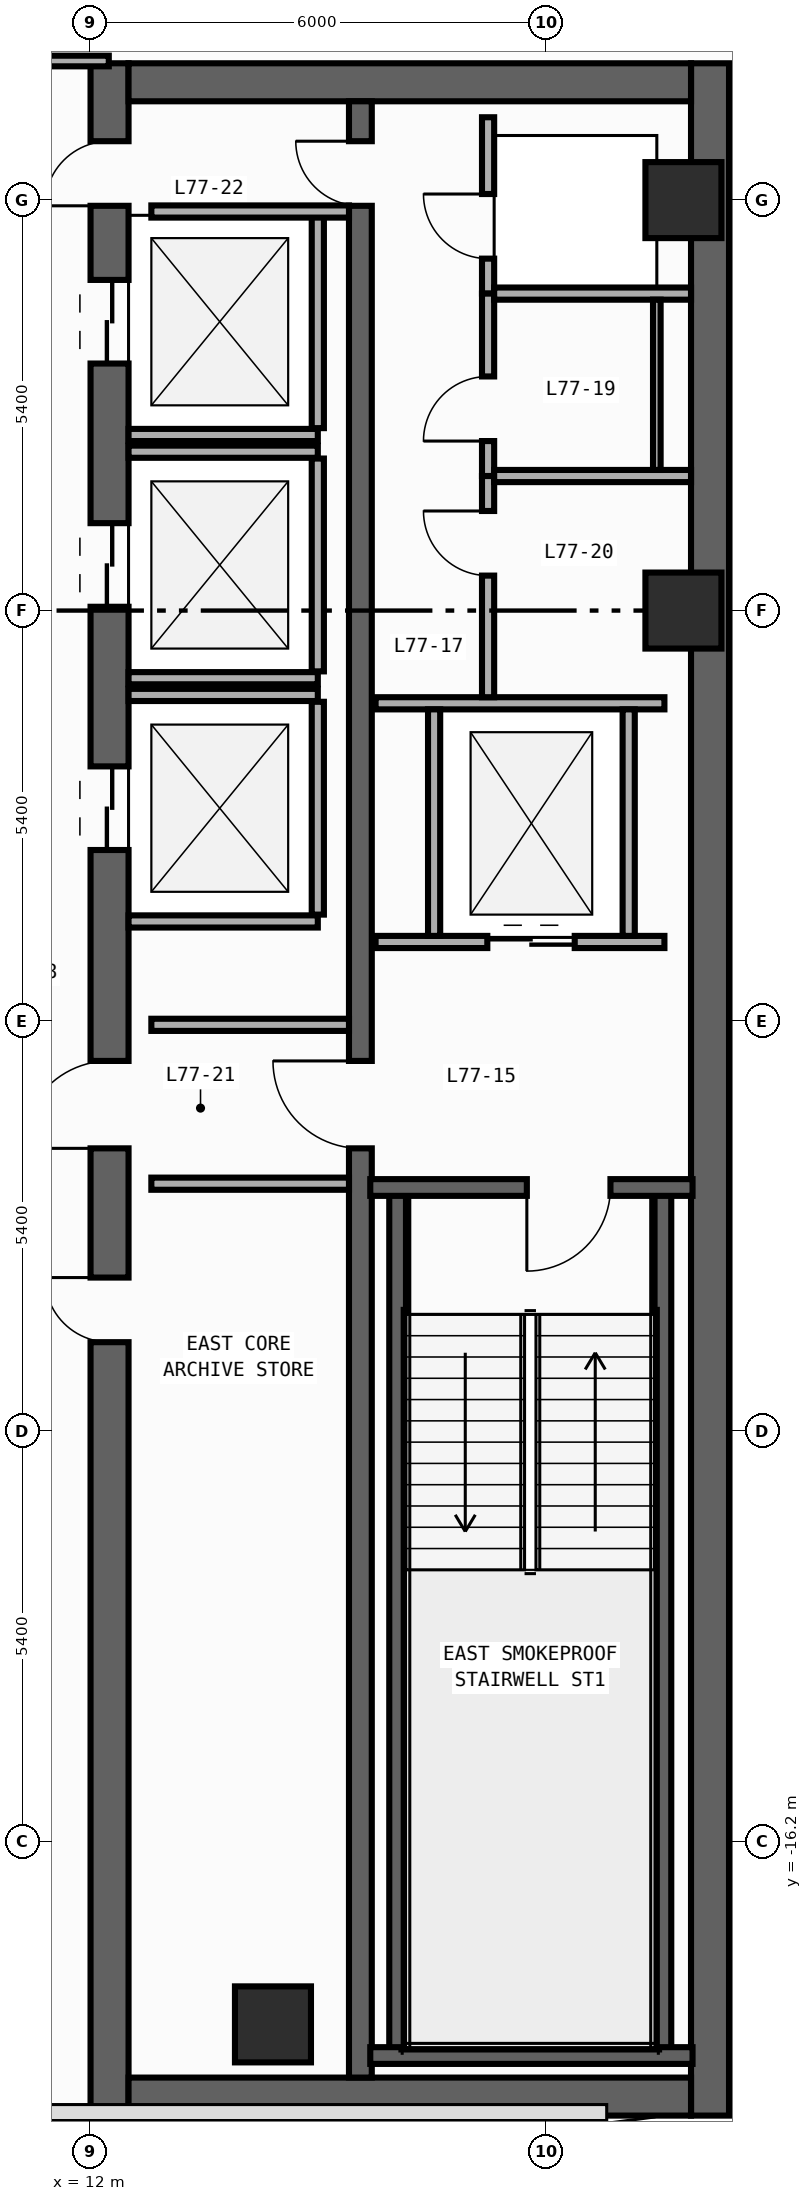
"""IFC4 building model, lengths in metres.
Left out: names, types, materials, properties, quantities, classifications, styles, units other than length and angle.
Written with IfcOpenShell. Run it as: python <this file> out.ifc"""

import sys

from ifc_helpers import new_model, si_unit, direction, frame, frame_2d, origin, origin_2d, place, context, subcontext, project, spatial, rectangle, circle, extrude, element, fill, save


model = new_model("IFC4")
c1 = context("Model", 3, precision=1e-05, world=origin(), true_north=direction((0.0, 1.0)))
c2 = subcontext(c1, "Body", "Model", "MODEL_VIEW")
j1 = project(units=[si_unit("LENGTHUNIT", "METRE"), si_unit("PLANEANGLEUNIT", "RADIAN")], contexts=[c1])
p1 = place(None, origin())
s1 = spatial("IfcSite", under=j1, at=p1, CompositionType="ELEMENT")
p2 = place(p1, origin())
s2 = spatial("IfcBuilding", under=s1, at=p2, CompositionType="ELEMENT")
p3 = place(p2, frame((0.0, 0.0, 320.4)))
s3 = spatial("IfcBuildingStorey", under=s2, at=p3, CompositionType="ELEMENT", Elevation=320.4)
p4 = place(p3, frame((12.25, -19.8, 0.0), z_axis=(0.0, 0.0, 1.0), x_axis=(0.0, 1.0, 0.0)))
e1 = element("IfcWall", 1, at=p4, inside=s3, PredefinedType="SHEAR", context=c2, shape_type="SweptSolid", body=[
    extrude(rectangle(XDim=27.0, YDim=0.5, at=frame_2d((13.5, 0.0))), origin(), (0.0, 0.0, 1.0), 4.45),
])
p5 = place(p4, frame((23.05, 0.0, 0.0)))
e2 = element("IfcOpeningElement", 2, at=p5, cuts=e1, PredefinedType="OPENING", context=c2, shape_type="SweptSolid", body=[
    extrude(rectangle(XDim=1.1, YDim=2.2, at=frame_2d((0.55, 1.1))), frame((0.0, 0.26, 0.0), z_axis=(0.0, -1.0, 0.0), x_axis=(1.0, 0.0, 0.0)), (0.0, 0.0, 1.0), 0.52),
])
p6 = place(p4, frame((19.85, 0.0, 0.0)))
e3 = element("IfcOpeningElement", 3, at=p6, cuts=e1, PredefinedType="OPENING", context=c2, shape_type="SweptSolid", body=[
    extrude(rectangle(XDim=1.1, YDim=2.2, at=frame_2d((0.55, 1.1))), frame((0.0, 0.26, 0.0), z_axis=(0.0, -1.0, 0.0), x_axis=(1.0, 0.0, 0.0)), (0.0, 0.0, 1.0), 0.52),
])
p7 = place(p4, frame((16.65, 0.0, 0.0)))
e4 = element("IfcOpeningElement", 4, at=p7, cuts=e1, PredefinedType="OPENING", context=c2, shape_type="SweptSolid", body=[
    extrude(rectangle(XDim=1.1, YDim=2.2, at=frame_2d((0.55, 1.1))), frame((0.0, 0.26, 0.0), z_axis=(0.0, -1.0, 0.0), x_axis=(1.0, 0.0, 0.0)), (0.0, 0.0, 1.0), 0.52),
])
p8 = place(p4, frame((10.175, 0.0, 0.0)))
e5 = element("IfcOpeningElement", 5, at=p8, cuts=e1, PredefinedType="OPENING", context=c2, shape_type="SweptSolid", body=[
    extrude(rectangle(XDim=0.85, YDim=2.1, at=frame_2d((0.425, 1.05))), frame((0.0, 0.26, 0.0), z_axis=(0.0, -1.0, 0.0), x_axis=(1.0, 0.0, 0.0)), (0.0, 0.0, 1.0), 0.52),
])
p9 = place(p4, frame((12.725, 0.0, 0.0)))
e6 = element("IfcOpeningElement", 6, at=p9, cuts=e1, PredefinedType="OPENING", context=c2, shape_type="SweptSolid", body=[
    extrude(rectangle(XDim=1.15, YDim=2.2, at=frame_2d((0.575, 1.1))), frame((0.0, 0.26, 0.0), z_axis=(0.0, -1.0, 0.0), x_axis=(1.0, 0.0, 0.0)), (0.0, 0.0, 1.0), 0.52),
])
p10 = place(p4, frame((25.125, 0.0, 0.0)))
e7 = element("IfcOpeningElement", 7, at=p10, cuts=e1, PredefinedType="OPENING", context=c2, shape_type="SweptSolid", body=[
    extrude(rectangle(XDim=0.85, YDim=2.1, at=frame_2d((0.425, 1.05))), frame((0.0, 0.26, 0.0), z_axis=(0.0, -1.0, 0.0), x_axis=(1.0, 0.0, 0.0)), (0.0, 0.0, 1.0), 0.52),
])
p11 = place(p3, frame((20.15, -19.8, 0.0), z_axis=(0.0, 0.0, 1.0), x_axis=(0.0, 1.0, 0.0)))
e8 = element("IfcWall", 8, at=p11, inside=s3, PredefinedType="SHEAR", context=c2, shape_type="SweptSolid", body=[
    extrude(rectangle(XDim=27.0, YDim=0.5, at=frame_2d((13.5, 0.0))), origin(), (0.0, 0.0, 1.0), 4.45),
])
for number, where, z_axis, x_axis in (
    (9, (12.5, -19.55, 0.0), (0.0, 0.0, 1.0), (1.0, 0.0, 0.0)),
    (10, (12.5, 6.95, 0.0), (0.0, 0.0, 1.0), (1.0, 0.0, 0.0)),
):
    element("IfcWall", number, at=place(p3, frame(where, z_axis=z_axis, x_axis=x_axis)), inside=s3, PredefinedType="SHEAR", context=c2, shape_type="SweptSolid", body=[
        extrude(rectangle(XDim=7.4, YDim=0.5, at=frame_2d((3.7, 0.0))), origin(), (0.0, 0.0, 1.0), 4.45),
    ])
p12 = place(p3, frame((15.55, -19.3, 0.0), z_axis=(0.0, 0.0, 1.0), x_axis=(0.0, 1.0, 0.0)))
e11 = element("IfcWall", 11, at=p12, inside=s3, PredefinedType="SHEAR", context=c2, shape_type="SweptSolid", body=[
    extrude(rectangle(XDim=26.0, YDim=0.3, at=frame_2d((13.0, 0.0))), origin(), (0.0, 0.0, 1.0), 4.45),
])
p13 = place(p12, frame((12.225, 0.0, 0.0)))
e12 = element("IfcOpeningElement", 12, at=p13, cuts=e11, PredefinedType="OPENING", context=c2, shape_type="SweptSolid", body=[
    extrude(rectangle(XDim=1.15, YDim=2.2, at=frame_2d((0.575, 1.1))), frame((0.0, 0.16, 0.0), z_axis=(0.0, -1.0, 0.0), x_axis=(1.0, 0.0, 0.0)), (0.0, 0.0, 1.0), 0.32),
])
p14 = place(p12, frame((24.625, 0.0, 0.0)))
e13 = element("IfcOpeningElement", 13, at=p14, cuts=e11, PredefinedType="OPENING", context=c2, shape_type="SweptSolid", body=[
    extrude(rectangle(XDim=0.85, YDim=2.1, at=frame_2d((0.425, 1.05))), frame((0.0, 0.16, 0.0), z_axis=(0.0, -1.0, 0.0), x_axis=(1.0, 0.0, 0.0)), (0.0, 0.0, 1.0), 0.32),
])
for number, where, z_axis, x_axis in (
    (14, (16.04, -19.01, 0.0), (0.0, 0.0, 1.0), (0.0, 1.0, 0.0)),
    (15, (19.53, -19.01, 0.0), (0.0, 0.0, 1.0), (0.0, 1.0, 0.0)),
):
    element("IfcWall", number, at=place(p3, frame(where, z_axis=z_axis, x_axis=x_axis)), inside=s3, PredefinedType="SHEAR", context=c2, shape_type="SweptSolid", body=[
        extrude(rectangle(XDim=11.42, YDim=0.22, at=frame_2d((5.71, 0.0))), origin(), (0.0, 0.0, 1.0), 4.45),
    ])
p15 = place(p3, frame((15.68, -19.01, 0.0), z_axis=(0.0, 0.0, 1.0), x_axis=(1.0, 0.0, 0.0)))
e16 = element("IfcWall", 16, at=p15, inside=s3, PredefinedType="SHEAR", context=c2, shape_type="SweptSolid", body=[
    extrude(rectangle(XDim=4.24, YDim=0.22, at=frame_2d((2.12, 0.0))), origin(), (0.0, 0.0, 1.0), 4.45),
])
p16 = place(p3, frame((19.92, -7.59, 0.0), z_axis=(0.0, 0.0, 1.0), x_axis=(-1.0, 0.0, 0.0)))
e17 = element("IfcWall", 17, at=p16, inside=s3, PredefinedType="SHEAR", context=c2, shape_type="SweptSolid", body=[
    extrude(rectangle(XDim=4.24, YDim=0.22, at=frame_2d((2.12, 0.0))), origin(), (0.0, 0.0, 1.0), 4.45),
])
p17 = place(p16, frame((1.08, 0.0, 0.0)))
e18 = element("IfcOpeningElement", 18, at=p17, cuts=e17, PredefinedType="OPENING", context=c2, shape_type="SweptSolid", body=[
    extrude(rectangle(XDim=1.1, YDim=2.2, at=frame_2d((0.55, 1.1))), frame((0.0, 0.12, 0.0), z_axis=(0.0, -1.0, 0.0), x_axis=(1.0, 0.0, 0.0)), (0.0, 0.0, 1.0), 0.24),
])
for number, where, z_axis, x_axis in (
    (19, (14.4, -18.6, 0.0), (0.0, 0.0, 1.0), (1.0, 0.0, 0.0)),
    (20, (19.8, 0.0, 0.0), (0.0, 0.0, 1.0), (1.0, 0.0, 0.0)),
    (21, (19.8, 5.4, 0.0), (0.0, 0.0, 1.0), (1.0, 0.0, 0.0)),
):
    element("IfcColumn", number, at=place(p3, frame(where, z_axis=z_axis, x_axis=x_axis)), inside=s3, PredefinedType="COLUMN", context=c2, shape_type="SweptSolid", body=[
        extrude(circle(Radius=0.5, at=origin_2d()), origin(), (0.0, 0.0, 1.0), 4.8),
    ])
p18 = place(p3, frame((12.5, 2.31, 0.0), z_axis=(0.0, 0.0, 1.0), x_axis=(1.0, 0.0, 0.0)))
e22 = element("IfcWall", 22, at=p18, inside=s3, PredefinedType="STANDARD", context=c2, shape_type="SweptSolid", body=[
    extrude(rectangle(XDim=2.49, YDim=0.16, at=frame_2d((1.245, 0.0))), origin(), (0.0, 0.0, 1.0), 4.45),
])
p19 = place(p3, frame((14.99, 2.4, 0.0), z_axis=(0.0, 0.0, 1.0), x_axis=(0.0, 1.0, 0.0)))
e23 = element("IfcWall", 23, at=p19, inside=s3, PredefinedType="STANDARD", context=c2, shape_type="SweptSolid", body=[
    extrude(rectangle(XDim=2.8, YDim=0.16, at=frame_2d((1.4, 0.0))), origin(), (0.0, 0.0, 1.0), 4.45),
])
for number, where, z_axis, x_axis in (
    (24, (12.5, -0.89, 0.0), (0.0, 0.0, 1.0), (1.0, 0.0, 0.0)),
    (25, (12.5, 2.09, 0.0), (0.0, 0.0, 1.0), (1.0, 0.0, 0.0)),
):
    element("IfcWall", number, at=place(p3, frame(where, z_axis=z_axis, x_axis=x_axis)), inside=s3, PredefinedType="STANDARD", context=c2, shape_type="SweptSolid", body=[
        extrude(rectangle(XDim=2.49, YDim=0.16, at=frame_2d((1.245, 0.0))), origin(), (0.0, 0.0, 1.0), 4.45),
    ])
p20 = place(p3, frame((14.99, -0.8, 0.0), z_axis=(0.0, 0.0, 1.0), x_axis=(0.0, 1.0, 0.0)))
e26 = element("IfcWall", 26, at=p20, inside=s3, PredefinedType="STANDARD", context=c2, shape_type="SweptSolid", body=[
    extrude(rectangle(XDim=2.8, YDim=0.16, at=frame_2d((1.4, 0.0))), origin(), (0.0, 0.0, 1.0), 4.45),
])
for number, where, z_axis, x_axis in (
    (27, (12.5, -4.09, 0.0), (0.0, 0.0, 1.0), (1.0, 0.0, 0.0)),
    (28, (12.5, -1.11, 0.0), (0.0, 0.0, 1.0), (1.0, 0.0, 0.0)),
):
    element("IfcWall", number, at=place(p3, frame(where, z_axis=z_axis, x_axis=x_axis)), inside=s3, PredefinedType="STANDARD", context=c2, shape_type="SweptSolid", body=[
        extrude(rectangle(XDim=2.49, YDim=0.16, at=frame_2d((1.245, 0.0))), origin(), (0.0, 0.0, 1.0), 4.45),
    ])
p21 = place(p3, frame((14.99, -4.0, 0.0), z_axis=(0.0, 0.0, 1.0), x_axis=(0.0, 1.0, 0.0)))
e29 = element("IfcWall", 29, at=p21, inside=s3, PredefinedType="STANDARD", context=c2, shape_type="SweptSolid", body=[
    extrude(rectangle(XDim=2.8, YDim=0.16, at=frame_2d((1.4, 0.0))), origin(), (0.0, 0.0, 1.0), 4.45),
])
p22 = place(p3, frame((15.75, -4.36, 0.0), z_axis=(0.0, 0.0, 1.0), x_axis=(1.0, 0.0, 0.0)))
e30 = element("IfcWall", 30, at=p22, inside=s3, PredefinedType="STANDARD", context=c2, shape_type="SweptSolid", body=[
    extrude(rectangle(XDim=3.8, YDim=0.16, at=frame_2d((1.9, 0.0))), origin(), (0.0, 0.0, 1.0), 4.45),
])
p23 = place(p22, frame((1.47, 0.0, 0.0)))
e31 = element("IfcOpeningElement", 31, at=p23, cuts=e30, PredefinedType="OPENING", context=c2, shape_type="SweptSolid", body=[
    extrude(rectangle(XDim=1.15, YDim=2.2, at=frame_2d((0.575, 1.1))), frame((0.0, 0.09, 0.0), z_axis=(0.0, -1.0, 0.0), x_axis=(1.0, 0.0, 0.0)), (0.0, 0.0, 1.0), 0.18),
])
p24 = place(p3, frame((15.75, -1.22, 0.0), z_axis=(0.0, 0.0, 1.0), x_axis=(1.0, 0.0, 0.0)))
e32 = element("IfcWall", 32, at=p24, inside=s3, PredefinedType="STANDARD", context=c2, shape_type="SweptSolid", body=[
    extrude(rectangle(XDim=3.8, YDim=0.16, at=frame_2d((1.9, 0.0))), origin(), (0.0, 0.0, 1.0), 4.45),
])
for number, where, z_axis, x_axis in (
    (33, (16.52, -4.28, 0.0), (0.0, 0.0, 1.0), (0.0, 1.0, 0.0)),
    (34, (19.08, -4.28, 0.0), (0.0, 0.0, 1.0), (0.0, 1.0, 0.0)),
):
    element("IfcWall", number, at=place(p3, frame(where, z_axis=z_axis, x_axis=x_axis)), inside=s3, PredefinedType="STANDARD", context=c2, shape_type="SweptSolid", body=[
        extrude(rectangle(XDim=2.98, YDim=0.16, at=frame_2d((1.49, 0.0))), origin(), (0.0, 0.0, 1.0), 4.45),
    ])
for number, where, z_axis, x_axis in (
    (35, (12.8, -5.45, 0.0), (0.0, 0.0, 1.0), (1.0, 0.0, 0.0)),
    (36, (12.8, -7.54, 0.0), (0.0, 0.0, 1.0), (1.0, 0.0, 0.0)),
    (37, (12.8, 5.25, 0.0), (0.0, 0.0, 1.0), (1.0, 0.0, 0.0)),
):
    element("IfcWall", number, at=place(p3, frame(where, z_axis=z_axis, x_axis=x_axis)), inside=s3, PredefinedType="STANDARD", context=c2, shape_type="SweptSolid", body=[
        extrude(rectangle(XDim=2.6, YDim=0.16, at=frame_2d((1.3, 0.0))), origin(), (0.0, 0.0, 1.0), 4.45),
    ])
p25 = place(p3, frame((17.23, 4.17, 0.0), z_axis=(0.0, 0.0, 1.0), x_axis=(0.0, 1.0, 0.0)))
e38 = element("IfcWall", 38, at=p25, inside=s3, PredefinedType="PARTITIONING", context=c2, shape_type="SweptSolid", body=[
    extrude(rectangle(XDim=2.32, YDim=0.16, at=frame_2d((1.16, 0.0))), origin(), (0.0, 0.0, 1.0), 4.45),
])
p26 = place(p25, frame((0.46, 0.0, 0.0)))
e39 = element("IfcOpeningElement", 39, at=p26, cuts=e38, PredefinedType="OPENING", context=c2, shape_type="SweptSolid", body=[
    extrude(rectangle(XDim=0.85, YDim=2.1, at=frame_2d((0.425, 1.05))), frame((0.0, 0.09, 0.0), z_axis=(0.0, -1.0, 0.0), x_axis=(1.0, 0.0, 0.0)), (0.0, 0.0, 1.0), 0.18),
])
p27 = place(p3, frame((17.23, 1.77, 0.0), z_axis=(0.0, 0.0, 1.0), x_axis=(0.0, 1.0, 0.0)))
e40 = element("IfcWall", 40, at=p27, inside=s3, PredefinedType="PARTITIONING", context=c2, shape_type="SweptSolid", body=[
    extrude(rectangle(XDim=2.4, YDim=0.16, at=frame_2d((1.2, 0.0))), origin(), (0.0, 0.0, 1.0), 4.45),
])
p28 = place(p27, frame((0.46, 0.0, 0.0)))
e41 = element("IfcOpeningElement", 41, at=p28, cuts=e40, PredefinedType="OPENING", context=c2, shape_type="SweptSolid", body=[
    extrude(rectangle(XDim=0.85, YDim=2.1, at=frame_2d((0.425, 1.05))), frame((0.0, 0.09, 0.0), z_axis=(0.0, -1.0, 0.0), x_axis=(1.0, 0.0, 0.0)), (0.0, 0.0, 1.0), 0.18),
])
p29 = place(p3, frame((17.23, -1.14, 0.0), z_axis=(0.0, 0.0, 1.0), x_axis=(0.0, 1.0, 0.0)))
e42 = element("IfcWall", 42, at=p29, inside=s3, PredefinedType="PARTITIONING", context=c2, shape_type="SweptSolid", body=[
    extrude(rectangle(XDim=2.91, YDim=0.16, at=frame_2d((1.455, 0.0))), origin(), (0.0, 0.0, 1.0), 4.45),
])
p30 = place(p29, frame((1.6, 0.0, 0.0)))
e43 = element("IfcOpeningElement", 43, at=p30, cuts=e42, PredefinedType="OPENING", context=c2, shape_type="SweptSolid", body=[
    extrude(rectangle(XDim=0.85, YDim=2.1, at=frame_2d((0.425, 1.05))), frame((0.0, 0.09, 0.0), z_axis=(0.0, -1.0, 0.0), x_axis=(1.0, 0.0, 0.0)), (0.0, 0.0, 1.0), 0.18),
])
for number, where, z_axis, x_axis in (
    (44, (17.31, 4.17, 0.0), (0.0, 0.0, 1.0), (1.0, 0.0, 0.0)),
    (45, (17.31, 1.77, 0.0), (0.0, 0.0, 1.0), (1.0, 0.0, 0.0)),
):
    element("IfcWall", number, at=place(p3, frame(where, z_axis=z_axis, x_axis=x_axis)), inside=s3, PredefinedType="PARTITIONING", context=c2, shape_type="SweptSolid", body=[
        extrude(rectangle(XDim=2.59, YDim=0.16, at=frame_2d((1.295, 0.0))), origin(), (0.0, 0.0, 1.0), 4.45),
    ])
p31 = place(p3, frame((4.52, 7.23, 0.0), z_axis=(0.0, 0.0, 1.0), x_axis=(1.0, 0.0, 0.0)))
e46 = element("IfcWall", 46, at=p31, inside=s3, PredefinedType="PARTITIONING", context=c2, shape_type="SweptSolid", body=[
    extrude(rectangle(XDim=7.72, YDim=0.14, at=frame_2d((3.86, 0.0))), origin(), (0.0, 0.0, 1.0), 3.55),
])
p32 = place(p31, frame((0.46, 0.0, 0.0)))
e47 = element("IfcOpeningElement", 47, at=p32, cuts=e46, PredefinedType="OPENING", context=c2, shape_type="SweptSolid", body=[
    extrude(rectangle(XDim=0.85, YDim=2.1, at=frame_2d((0.425, 1.05))), frame((0.0, 0.08, 0.0), z_axis=(0.0, -1.0, 0.0), x_axis=(1.0, 0.0, 0.0)), (0.0, 0.0, 1.0), 0.16),
])
p33 = place(p3, frame((19.45, 4.09, 0.0), z_axis=(0.0, 0.0, 1.0), x_axis=(0.0, -1.0, 0.0)))
e48 = element("IfcWall", 48, at=p33, inside=s3, PredefinedType="PARTITIONING", context=c2, shape_type="SweptSolid", body=[
    extrude(rectangle(XDim=2.24, YDim=0.1, at=frame_2d((1.12, 0.0))), origin(), (0.0, 0.0, 1.0), 4.45),
])
p34 = place(p17, origin())
e49 = element("IfcDoor", 49, at=p34, inside=s3, OperationType="SINGLE_SWING_RIGHT", PredefinedType="DOOR", context=c2, shape_type="SweptSolid", body=[
    extrude(rectangle(XDim=1.1, YDim=2.2, at=frame_2d((0.55, 1.1))), frame((0.0, 0.025, 0.0), z_axis=(0.0, -1.0, 0.0), x_axis=(1.0, 0.0, 0.0)), (0.0, 0.0, 1.0), 0.05),
])
fill(e18, e49)
p35 = place(p5, origin())
e50 = element("IfcDoor", 50, at=p35, inside=s3, OperationType="DOUBLE_DOOR_SLIDING", PredefinedType="DOOR", context=c2, shape_type="SweptSolid", body=[
    extrude(rectangle(XDim=1.1, YDim=2.2, at=frame_2d((0.55, 1.1))), frame((0.0, 0.025, 0.0), z_axis=(0.0, -1.0, 0.0), x_axis=(1.0, 0.0, 0.0)), (0.0, 0.0, 1.0), 0.05),
])
fill(e2, e50)
p36 = place(p6, origin())
e51 = element("IfcDoor", 51, at=p36, inside=s3, OperationType="DOUBLE_DOOR_SLIDING", PredefinedType="DOOR", context=c2, shape_type="SweptSolid", body=[
    extrude(rectangle(XDim=1.1, YDim=2.2, at=frame_2d((0.55, 1.1))), frame((0.0, 0.025, 0.0), z_axis=(0.0, -1.0, 0.0), x_axis=(1.0, 0.0, 0.0)), (0.0, 0.0, 1.0), 0.05),
])
fill(e3, e51)
p37 = place(p7, origin())
e52 = element("IfcDoor", 52, at=p37, inside=s3, OperationType="DOUBLE_DOOR_SLIDING", PredefinedType="DOOR", context=c2, shape_type="SweptSolid", body=[
    extrude(rectangle(XDim=1.1, YDim=2.2, at=frame_2d((0.55, 1.1))), frame((0.0, 0.025, 0.0), z_axis=(0.0, -1.0, 0.0), x_axis=(1.0, 0.0, 0.0)), (0.0, 0.0, 1.0), 0.05),
])
fill(e4, e52)
p38 = place(p8, origin())
e53 = element("IfcDoor", 53, at=p38, inside=s3, OperationType="SINGLE_SWING_RIGHT", PredefinedType="DOOR", context=c2, shape_type="SweptSolid", body=[
    extrude(rectangle(XDim=0.85, YDim=2.1, at=frame_2d((0.425, 1.05))), frame((0.0, 0.025, 0.0), z_axis=(0.0, -1.0, 0.0), x_axis=(1.0, 0.0, 0.0)), (0.0, 0.0, 1.0), 0.05),
])
fill(e5, e53)
p39 = place(p9, origin())
e54 = element("IfcDoor", 54, at=p39, inside=s3, OperationType="SINGLE_SWING_LEFT", PredefinedType="DOOR", context=c2, shape_type="SweptSolid", body=[
    extrude(rectangle(XDim=1.15, YDim=2.2, at=frame_2d((0.575, 1.1))), frame((0.0, 0.025, 0.0), z_axis=(0.0, -1.0, 0.0), x_axis=(1.0, 0.0, 0.0)), (0.0, 0.0, 1.0), 0.05),
])
fill(e6, e54)
p40 = place(p13, origin())
e55 = element("IfcDoor", 55, at=p40, inside=s3, OperationType="SINGLE_SWING_RIGHT", PredefinedType="DOOR", context=c2, shape_type="SweptSolid", body=[
    extrude(rectangle(XDim=1.15, YDim=2.2, at=frame_2d((0.575, 1.1))), frame((0.0, 0.025, 0.0), z_axis=(0.0, -1.0, 0.0), x_axis=(1.0, 0.0, 0.0)), (0.0, 0.0, 1.0), 0.05),
])
fill(e12, e55)
p41 = place(p10, origin())
e56 = element("IfcDoor", 56, at=p41, inside=s3, OperationType="SINGLE_SWING_LEFT", PredefinedType="DOOR", context=c2, shape_type="SweptSolid", body=[
    extrude(rectangle(XDim=0.85, YDim=2.1, at=frame_2d((0.425, 1.05))), frame((0.0, 0.025, 0.0), z_axis=(0.0, -1.0, 0.0), x_axis=(1.0, 0.0, 0.0)), (0.0, 0.0, 1.0), 0.05),
])
fill(e7, e56)
p42 = place(p14, origin())
e57 = element("IfcDoor", 57, at=p42, inside=s3, OperationType="SINGLE_SWING_RIGHT", PredefinedType="DOOR", context=c2, shape_type="SweptSolid", body=[
    extrude(rectangle(XDim=0.85, YDim=2.1, at=frame_2d((0.425, 1.05))), frame((0.0, 0.025, 0.0), z_axis=(0.0, -1.0, 0.0), x_axis=(1.0, 0.0, 0.0)), (0.0, 0.0, 1.0), 0.05),
])
fill(e13, e57)
p43 = place(p23, origin())
e58 = element("IfcDoor", 58, at=p43, inside=s3, OperationType="DOUBLE_DOOR_SLIDING", PredefinedType="DOOR", context=c2, shape_type="SweptSolid", body=[
    extrude(rectangle(XDim=1.15, YDim=2.2, at=frame_2d((0.575, 1.1))), frame((0.0, 0.025, 0.0), z_axis=(0.0, -1.0, 0.0), x_axis=(1.0, 0.0, 0.0)), (0.0, 0.0, 1.0), 0.05),
])
fill(e31, e58)
p44 = place(p26, origin())
e59 = element("IfcDoor", 59, at=p44, inside=s3, OperationType="SINGLE_SWING_RIGHT", PredefinedType="DOOR", context=c2, shape_type="SweptSolid", body=[
    extrude(rectangle(XDim=0.85, YDim=2.1, at=frame_2d((0.425, 1.05))), frame((0.0, 0.025, 0.0), z_axis=(0.0, -1.0, 0.0), x_axis=(1.0, 0.0, 0.0)), (0.0, 0.0, 1.0), 0.05),
])
fill(e39, e59)
p45 = place(p28, origin())
e60 = element("IfcDoor", 60, at=p45, inside=s3, OperationType="SINGLE_SWING_LEFT", PredefinedType="DOOR", context=c2, shape_type="SweptSolid", body=[
    extrude(rectangle(XDim=0.85, YDim=2.1, at=frame_2d((0.425, 1.05))), frame((0.0, 0.025, 0.0), z_axis=(0.0, -1.0, 0.0), x_axis=(1.0, 0.0, 0.0)), (0.0, 0.0, 1.0), 0.05),
])
fill(e41, e60)
p46 = place(p30, origin())
e61 = element("IfcDoor", 61, at=p46, inside=s3, OperationType="SINGLE_SWING_RIGHT", PredefinedType="DOOR", context=c2, shape_type="SweptSolid", body=[
    extrude(rectangle(XDim=0.85, YDim=2.1, at=frame_2d((0.425, 1.05))), frame((0.0, 0.025, 0.0), z_axis=(0.0, -1.0, 0.0), x_axis=(1.0, 0.0, 0.0)), (0.0, 0.0, 1.0), 0.05),
])
fill(e43, e61)
save(model, sys.argv[1])
